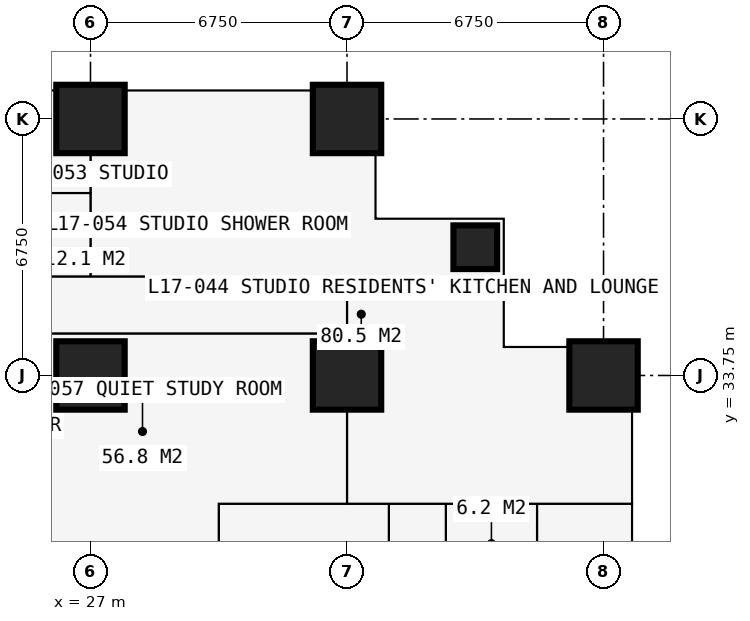
"""IFC4 building model, lengths in metres.
Left out: names, types, materials, properties, quantities, classifications, styles, units other than length and angle.
Written with IfcOpenShell. Run it as: python <this file> out.ifc"""

import sys

from ifc_helpers import new_model, si_unit, direction, frame, frame_2d, origin, origin_2d, place, context, subcontext, project, spatial, rectangle, extrude, element, fill, save


model = new_model("IFC4")
c1 = context("Model", 3, precision=1e-05, world=origin(), true_north=direction((0.0, 1.0)))
c2 = subcontext(c1, "Body", "Model", "MODEL_VIEW")
j1 = project(units=[si_unit("LENGTHUNIT", "METRE"), si_unit("PLANEANGLEUNIT", "RADIAN")], contexts=[c1])
p1 = place(None, origin())
s1 = spatial("IfcSite", under=j1, at=p1, CompositionType="ELEMENT")
p2 = place(p1, origin())
s2 = spatial("IfcBuilding", under=s1, at=p2, CompositionType="ELEMENT")
p3 = place(p2, frame((0.0, 0.0, 64.8)))
s3 = spatial("IfcBuildingStorey", under=s2, at=p3, CompositionType="ELEMENT", Elevation=64.8)
for number, where, z_axis, x_axis in (
    (1, (27.0, 33.75, 0.0), (0.0, 0.0, 1.0), (1.0, 0.0, 0.0)),
    (2, (27.0, 40.5, 0.0), (0.0, 0.0, 1.0), (1.0, 0.0, 0.0)),
    (3, (33.75, 33.75, 0.0), (0.0, 0.0, 1.0), (1.0, 0.0, 0.0)),
    (4, (33.75, 40.5, 0.0), (0.0, 0.0, 1.0), (1.0, 0.0, 0.0)),
):
    element("IfcColumn", number, at=place(p3, frame(where, z_axis=z_axis, x_axis=x_axis)), inside=s3, PredefinedType="COLUMN", context=c2, shape_type="SweptSolid", body=[
        extrude(rectangle(XDim=1.8, YDim=1.8, at=origin_2d()), origin(), (0.0, 0.0, 1.0), 3.6),
    ])
p4 = place(p3, frame((37.125, 37.125, 0.0), z_axis=(0.0, 0.0, 1.0), x_axis=(1.0, 0.0, 0.0)))
e5 = element("IfcColumn", 5, at=p4, inside=s3, PredefinedType="COLUMN", context=c2, shape_type="SweptSolid", body=[
    extrude(rectangle(XDim=1.15, YDim=1.15, at=origin_2d()), origin(), (0.0, 0.0, 1.0), 3.6),
])
p5 = place(p3, frame((40.5, 33.75, 0.0), z_axis=(0.0, 0.0, 1.0), x_axis=(1.0, 0.0, 0.0)))
e6 = element("IfcColumn", 6, at=p5, inside=s3, PredefinedType="COLUMN", context=c2, shape_type="SweptSolid", body=[
    extrude(rectangle(XDim=1.8, YDim=1.8, at=origin_2d()), origin(), (0.0, 0.0, 1.0), 3.6),
])
p6 = place(p3, frame((41.25, 34.5, 0.0), z_axis=(0.0, 0.0, 1.0), x_axis=(-1.0, 0.0, 0.0)))
e7 = element("IfcWall", 7, at=p6, inside=s3, PredefinedType="SOLIDWALL", context=c2, shape_type="SweptSolid", body=[
    extrude(rectangle(XDim=3.375, YDim=0.3, at=frame_2d((1.688, 0.0))), origin(), (0.0, 0.0, 1.0), 3.375),
])
p7 = place(p6, frame((1.833, 0.0, 0.9)))
e8 = element("IfcOpeningElement", 8, at=p7, cuts=e7, PredefinedType="OPENING", context=c2, shape_type="SweptSolid", body=[
    extrude(rectangle(XDim=1.2, YDim=1.8, at=frame_2d((0.6, 0.9))), frame((0.0, 0.16, 0.0), z_axis=(0.0, -1.0, 0.0), x_axis=(1.0, 0.0, 0.0)), (0.0, 0.0, 1.0), 0.32),
])
p8 = place(p3, frame((37.875, 34.5, 0.0), z_axis=(0.0, 0.0, 1.0), x_axis=(0.0, 1.0, 0.0)))
e9 = element("IfcWall", 9, at=p8, inside=s3, PredefinedType="SOLIDWALL", context=c2, shape_type="SweptSolid", body=[
    extrude(rectangle(XDim=3.375, YDim=0.3, at=frame_2d((1.688, 0.0))), origin(), (0.0, 0.0, 1.0), 3.375),
])
p9 = place(p8, frame((0.788, 0.0, 0.6)))
e10 = element("IfcOpeningElement", 10, at=p9, cuts=e9, PredefinedType="OPENING", context=c2, shape_type="SweptSolid", body=[
    extrude(rectangle(XDim=1.8, YDim=2.1, at=frame_2d((0.9, 1.05))), frame((0.0, 0.16, 0.0), z_axis=(0.0, -1.0, 0.0), x_axis=(1.0, 0.0, 0.0)), (0.0, 0.0, 1.0), 0.32),
])
p10 = place(p3, frame((37.875, 37.875, 0.0), z_axis=(0.0, 0.0, 1.0), x_axis=(-1.0, 0.0, 0.0)))
e11 = element("IfcWall", 11, at=p10, inside=s3, PredefinedType="SOLIDWALL", context=c2, shape_type="SweptSolid", body=[
    extrude(rectangle(XDim=3.375, YDim=0.3, at=frame_2d((1.688, 0.0))), origin(), (0.0, 0.0, 1.0), 3.375),
])
p11 = place(p10, frame((0.788, 0.0, 0.6)))
e12 = element("IfcOpeningElement", 12, at=p11, cuts=e11, PredefinedType="OPENING", context=c2, shape_type="SweptSolid", body=[
    extrude(rectangle(XDim=1.8, YDim=2.1, at=frame_2d((0.9, 1.05))), frame((0.0, 0.16, 0.0), z_axis=(0.0, -1.0, 0.0), x_axis=(1.0, 0.0, 0.0)), (0.0, 0.0, 1.0), 0.32),
])
p12 = place(p3, frame((34.5, 37.875, 0.0), z_axis=(0.0, 0.0, 1.0), x_axis=(0.0, 1.0, 0.0)))
e13 = element("IfcWall", 13, at=p12, inside=s3, PredefinedType="SOLIDWALL", context=c2, shape_type="SweptSolid", body=[
    extrude(rectangle(XDim=3.375, YDim=0.3, at=frame_2d((1.688, 0.0))), origin(), (0.0, 0.0, 1.0), 3.375),
])
p13 = place(p12, frame((0.343, 0.0, 0.9)))
e14 = element("IfcOpeningElement", 14, at=p13, cuts=e13, PredefinedType="OPENING", context=c2, shape_type="SweptSolid", body=[
    extrude(rectangle(XDim=1.2, YDim=1.8, at=frame_2d((0.6, 0.9))), frame((0.0, 0.16, 0.0), z_axis=(0.0, -1.0, 0.0), x_axis=(1.0, 0.0, 0.0)), (0.0, 0.0, 1.0), 0.32),
])
p14 = place(p3, frame((20.25, 41.25, 0.0), z_axis=(0.0, 0.0, 1.0), x_axis=(1.0, 0.0, 0.0)))
e15 = element("IfcWall", 15, at=p14, inside=s3, PredefinedType="SOLIDWALL", context=c2, shape_type="SweptSolid", body=[
    extrude(rectangle(XDim=6.75, YDim=0.15, at=frame_2d((3.375, 0.0))), origin(), (0.0, 0.0, 1.0), 3.375),
])
p15 = place(p14, frame((0.962, 0.0, 0.0)))
e16 = element("IfcOpeningElement", 16, at=p15, cuts=e15, PredefinedType="OPENING", context=c2, shape_type="SweptSolid", body=[
    extrude(rectangle(XDim=1.0, YDim=2.2, at=frame_2d((0.5, 1.1))), frame((0.0, 0.085, 0.0), z_axis=(0.0, -1.0, 0.0), x_axis=(1.0, 0.0, 0.0)), (0.0, 0.0, 1.0), 0.17),
])
p16 = place(p14, frame((2.025, 0.0, 0.9)))
e17 = element("IfcOpeningElement", 17, at=p16, cuts=e15, PredefinedType="OPENING", context=c2, shape_type="SweptSolid", body=[
    extrude(rectangle(XDim=1.2, YDim=1.8, at=frame_2d((0.6, 0.9))), frame((0.0, 0.085, 0.0), z_axis=(0.0, -1.0, 0.0), x_axis=(1.0, 0.0, 0.0)), (0.0, 0.0, 1.0), 0.17),
])
p17 = place(p14, frame((4.788, 0.0, 0.0)))
e18 = element("IfcOpeningElement", 18, at=p17, cuts=e15, PredefinedType="OPENING", context=c2, shape_type="SweptSolid", body=[
    extrude(rectangle(XDim=1.0, YDim=2.2, at=frame_2d((0.5, 1.1))), frame((0.0, 0.085, 0.0), z_axis=(0.0, -1.0, 0.0), x_axis=(1.0, 0.0, 0.0)), (0.0, 0.0, 1.0), 0.17),
])
p18 = place(p14, frame((3.525, 0.0, 0.9)))
e19 = element("IfcOpeningElement", 19, at=p18, cuts=e15, PredefinedType="OPENING", context=c2, shape_type="SweptSolid", body=[
    extrude(rectangle(XDim=1.2, YDim=1.8, at=frame_2d((0.6, 0.9))), frame((0.0, 0.085, 0.0), z_axis=(0.0, -1.0, 0.0), x_axis=(1.0, 0.0, 0.0)), (0.0, 0.0, 1.0), 0.17),
])
p19 = place(p3, frame((10.125, 36.35, 0.0), z_axis=(0.0, 0.0, 1.0), x_axis=(1.0, 0.0, 0.0)))
e20 = element("IfcWall", 20, at=p19, inside=s3, PredefinedType="PARTITIONING", context=c2, shape_type="SweptSolid", body=[
    extrude(rectangle(XDim=23.625, YDim=0.1, at=frame_2d((11.812, 0.0))), origin(), (0.0, 0.0, 1.0), 3.375),
])
p20 = place(p19, frame((0.2, 0.0, 0.0)))
e21 = element("IfcOpeningElement", 21, at=p20, cuts=e20, PredefinedType="OPENING", context=c2, shape_type="SweptSolid", body=[
    extrude(rectangle(XDim=0.95, YDim=2.2, at=frame_2d((0.475, 1.1))), frame((0.0, 0.06, 0.0), z_axis=(0.0, -1.0, 0.0), x_axis=(1.0, 0.0, 0.0)), (0.0, 0.0, 1.0), 0.12),
])
p21 = place(p19, frame((3.625, 0.0, 0.0)))
e22 = element("IfcOpeningElement", 22, at=p21, cuts=e20, PredefinedType="OPENING", context=c2, shape_type="SweptSolid", body=[
    extrude(rectangle(XDim=0.95, YDim=2.2, at=frame_2d((0.475, 1.1))), frame((0.0, 0.06, 0.0), z_axis=(0.0, -1.0, 0.0), x_axis=(1.0, 0.0, 0.0)), (0.0, 0.0, 1.0), 0.12),
])
p22 = place(p19, frame((7.0, 0.0, 0.0)))
e23 = element("IfcOpeningElement", 23, at=p22, cuts=e20, PredefinedType="OPENING", context=c2, shape_type="SweptSolid", body=[
    extrude(rectangle(XDim=0.95, YDim=2.2, at=frame_2d((0.475, 1.1))), frame((0.0, 0.06, 0.0), z_axis=(0.0, -1.0, 0.0), x_axis=(1.0, 0.0, 0.0)), (0.0, 0.0, 1.0), 0.12),
])
p23 = place(p19, frame((10.375, 0.0, 0.0)))
e24 = element("IfcOpeningElement", 24, at=p23, cuts=e20, PredefinedType="OPENING", context=c2, shape_type="SweptSolid", body=[
    extrude(rectangle(XDim=0.95, YDim=2.2, at=frame_2d((0.475, 1.1))), frame((0.0, 0.06, 0.0), z_axis=(0.0, -1.0, 0.0), x_axis=(1.0, 0.0, 0.0)), (0.0, 0.0, 1.0), 0.12),
])
p24 = place(p19, frame((13.75, 0.0, 0.0)))
e25 = element("IfcOpeningElement", 25, at=p24, cuts=e20, PredefinedType="OPENING", context=c2, shape_type="SweptSolid", body=[
    extrude(rectangle(XDim=0.95, YDim=2.2, at=frame_2d((0.475, 1.1))), frame((0.0, 0.06, 0.0), z_axis=(0.0, -1.0, 0.0), x_axis=(1.0, 0.0, 0.0)), (0.0, 0.0, 1.0), 0.12),
])
p25 = place(p3, frame((22.988, 34.85, 0.0), z_axis=(0.0, 0.0, 1.0), x_axis=(1.0, 0.0, 0.0)))
e26 = element("IfcWall", 26, at=p25, inside=s3, PredefinedType="PARTITIONING", context=c2, shape_type="SweptSolid", body=[
    extrude(rectangle(XDim=10.762, YDim=0.15, at=frame_2d((5.381, 0.0))), origin(), (0.0, 0.0, 1.0), 3.375),
])
p26 = place(p25, frame((4.95, 0.0, 0.0)))
e27 = element("IfcOpeningElement", 27, at=p26, cuts=e26, PredefinedType="OPENING", context=c2, shape_type="SweptSolid", body=[
    extrude(rectangle(XDim=0.95, YDim=2.2, at=frame_2d((0.475, 1.1))), frame((0.0, 0.085, 0.0), z_axis=(0.0, -1.0, 0.0), x_axis=(1.0, 0.0, 0.0)), (0.0, 0.0, 1.0), 0.17),
])
p27 = place(p3, frame((25.0, 38.55, 0.0), z_axis=(0.0, 0.0, 1.0), x_axis=(1.0, 0.0, 0.0)))
e28 = element("IfcWall", 28, at=p27, inside=s3, PredefinedType="PARTITIONING", context=c2, shape_type="SweptSolid", body=[
    extrude(rectangle(XDim=2.0, YDim=0.1, at=frame_2d((1.0, 0.0))), origin(), (0.0, 0.0, 1.0), 3.375),
])
p28 = place(p3, frame((27.0, 36.35, 0.0), z_axis=(0.0, 0.0, 1.0), x_axis=(0.0, 1.0, 0.0)))
e29 = element("IfcWall", 29, at=p28, inside=s3, PredefinedType="PARTITIONING", context=c2, shape_type="SweptSolid", body=[
    extrude(rectangle(XDim=4.884, YDim=0.15, at=frame_2d((2.442, 0.0))), origin(), (0.0, 0.0, 1.0), 2.806),
])
p29 = place(p3, frame((30.375, 29.2, 0.0), z_axis=(0.0, 0.0, 1.0), x_axis=(0.0, 1.0, 0.0)))
e30 = element("IfcWall", 30, at=p29, inside=s3, PredefinedType="PARTITIONING", context=c2, shape_type="SweptSolid", body=[
    extrude(rectangle(XDim=1.175, YDim=0.15, at=frame_2d((0.587, 0.0))), origin(), (0.0, 0.0, 1.0), 3.375),
])
p30 = place(p3, frame((30.375, 30.375, 0.0), z_axis=(0.0, 0.0, 1.0), x_axis=(1.0, 0.0, 0.0)))
e31 = element("IfcWall", 31, at=p30, inside=s3, PredefinedType="PARTITIONING", context=c2, shape_type="SweptSolid", body=[
    extrude(rectangle(XDim=10.859, YDim=0.15, at=frame_2d((5.429, 0.0))), origin(), (0.0, 0.0, 1.0), 3.375),
])
p31 = place(p30, frame((4.725, 0.0, 0.0)))
e32 = element("IfcOpeningElement", 32, at=p31, cuts=e31, PredefinedType="OPENING", context=c2, shape_type="SweptSolid", body=[
    extrude(rectangle(XDim=1.0, YDim=2.2, at=frame_2d((0.5, 1.1))), frame((0.0, 0.085, 0.0), z_axis=(0.0, -1.0, 0.0), x_axis=(1.0, 0.0, 0.0)), (0.0, 0.0, 1.0), 0.17),
])
p32 = place(p3, frame((33.75, 30.375, 0.0), z_axis=(0.0, 0.0, 1.0), x_axis=(0.0, 1.0, 0.0)))
e33 = element("IfcWall", 33, at=p32, inside=s3, PredefinedType="PARTITIONING", context=c2, shape_type="SweptSolid", body=[
    extrude(rectangle(XDim=5.975, YDim=0.15, at=frame_2d((2.988, 0.0))), origin(), (0.0, 0.0, 1.0), 2.877),
])
p33 = place(p3, frame((34.85, 12.55, 0.0), z_axis=(0.0, 0.0, 1.0), x_axis=(0.0, 1.0, 0.0)))
e34 = element("IfcWall", 34, at=p33, inside=s3, PredefinedType="PARTITIONING", context=c2, shape_type="SweptSolid", body=[
    extrude(rectangle(XDim=17.825, YDim=0.15, at=frame_2d((8.913, 0.0))), origin(), (0.0, 0.0, 1.0), 3.375),
])
p34 = place(p33, frame((8.6, 0.0, 0.0)))
e35 = element("IfcOpeningElement", 35, at=p34, cuts=e34, PredefinedType="OPENING", context=c2, shape_type="SweptSolid", body=[
    extrude(rectangle(XDim=0.95, YDim=2.2, at=frame_2d((0.475, 1.1))), frame((0.0, 0.085, 0.0), z_axis=(0.0, -1.0, 0.0), x_axis=(1.0, 0.0, 0.0)), (0.0, 0.0, 1.0), 0.17),
])
p35 = place(p3, frame((36.35, 6.75, 0.0), z_axis=(0.0, 0.0, 1.0), x_axis=(0.0, 1.0, 0.0)))
e36 = element("IfcWall", 36, at=p35, inside=s3, PredefinedType="PARTITIONING", context=c2, shape_type="SweptSolid", body=[
    extrude(rectangle(XDim=23.625, YDim=0.15, at=frame_2d((11.812, 0.0))), origin(), (0.0, 0.0, 1.0), 3.375),
])
p36 = place(p35, frame((18.475, 0.0, 0.0)))
e37 = element("IfcOpeningElement", 37, at=p36, cuts=e36, PredefinedType="OPENING", context=c2, shape_type="SweptSolid", body=[
    extrude(rectangle(XDim=0.95, YDim=2.2, at=frame_2d((0.475, 1.1))), frame((0.0, 0.085, 0.0), z_axis=(0.0, -1.0, 0.0), x_axis=(1.0, 0.0, 0.0)), (0.0, 0.0, 1.0), 0.17),
])
p37 = place(p35, frame((11.725, 0.0, 0.0)))
e38 = element("IfcOpeningElement", 38, at=p37, cuts=e36, PredefinedType="OPENING", context=c2, shape_type="SweptSolid", body=[
    extrude(rectangle(XDim=0.95, YDim=2.2, at=frame_2d((0.475, 1.1))), frame((0.0, 0.085, 0.0), z_axis=(0.0, -1.0, 0.0), x_axis=(1.0, 0.0, 0.0)), (0.0, 0.0, 1.0), 0.17),
])
p38 = place(p35, frame((6.95, 0.0, 0.0)))
e39 = element("IfcOpeningElement", 39, at=p38, cuts=e36, PredefinedType="OPENING", context=c2, shape_type="SweptSolid", body=[
    extrude(rectangle(XDim=0.95, YDim=2.2, at=frame_2d((0.475, 1.1))), frame((0.0, 0.085, 0.0), z_axis=(0.0, -1.0, 0.0), x_axis=(1.0, 0.0, 0.0)), (0.0, 0.0, 1.0), 0.17),
])
p39 = place(p3, frame((38.75, 27.775, 0.0), z_axis=(0.0, 0.0, 1.0), x_axis=(0.0, 1.0, 0.0)))
e40 = element("IfcWall", 40, at=p39, inside=s3, PredefinedType="PARTITIONING", context=c2, shape_type="SweptSolid", body=[
    extrude(rectangle(XDim=2.6, YDim=0.1, at=frame_2d((1.3, 0.0))), origin(), (0.0, 0.0, 1.0), 3.375),
])
p40 = place(p39, frame((0.85, 0.0, 0.0)))
e41 = element("IfcOpeningElement", 41, at=p40, cuts=e40, PredefinedType="OPENING", context=c2, shape_type="SweptSolid", body=[
    extrude(rectangle(XDim=0.9, YDim=2.2, at=frame_2d((0.45, 1.1))), frame((0.0, 0.06, 0.0), z_axis=(0.0, -1.0, 0.0), x_axis=(1.0, 0.0, 0.0)), (0.0, 0.0, 1.0), 0.12),
])
p41 = place(p7, origin())
e42 = element("IfcWindow", 42, at=p41, inside=s3, PartitioningType="SINGLE_PANEL", PredefinedType="WINDOW", context=c2, shape_type="SweptSolid", body=[
    extrude(rectangle(XDim=1.2, YDim=1.8, at=frame_2d((0.6, 0.9))), frame((0.0, 0.03, 0.0), z_axis=(0.0, -1.0, 0.0), x_axis=(1.0, 0.0, 0.0)), (0.0, 0.0, 1.0), 0.06),
])
fill(e8, e42)
p42 = place(p9, origin())
e43 = element("IfcWindow", 43, at=p42, inside=s3, PartitioningType="SINGLE_PANEL", PredefinedType="WINDOW", context=c2, shape_type="SweptSolid", body=[
    extrude(rectangle(XDim=1.8, YDim=2.1, at=frame_2d((0.9, 1.05))), frame((0.0, 0.03, 0.0), z_axis=(0.0, -1.0, 0.0), x_axis=(1.0, 0.0, 0.0)), (0.0, 0.0, 1.0), 0.06),
])
fill(e10, e43)
p43 = place(p11, origin())
e44 = element("IfcWindow", 44, at=p43, inside=s3, PartitioningType="SINGLE_PANEL", PredefinedType="WINDOW", context=c2, shape_type="SweptSolid", body=[
    extrude(rectangle(XDim=1.8, YDim=2.1, at=frame_2d((0.9, 1.05))), frame((0.0, 0.03, 0.0), z_axis=(0.0, -1.0, 0.0), x_axis=(1.0, 0.0, 0.0)), (0.0, 0.0, 1.0), 0.06),
])
fill(e12, e44)
p44 = place(p13, origin())
e45 = element("IfcWindow", 45, at=p44, inside=s3, PartitioningType="SINGLE_PANEL", PredefinedType="WINDOW", context=c2, shape_type="SweptSolid", body=[
    extrude(rectangle(XDim=1.2, YDim=1.8, at=frame_2d((0.6, 0.9))), frame((0.0, 0.03, 0.0), z_axis=(0.0, -1.0, 0.0), x_axis=(1.0, 0.0, 0.0)), (0.0, 0.0, 1.0), 0.06),
])
fill(e14, e45)
p45 = place(p17, origin())
e46 = element("IfcDoor", 46, at=p45, inside=s3, OperationType="SINGLE_SWING_RIGHT", PredefinedType="DOOR", context=c2, shape_type="SweptSolid", body=[
    extrude(rectangle(XDim=1.0, YDim=2.2, at=frame_2d((0.5, 1.1))), frame((0.0, 0.025, 0.0), z_axis=(0.0, -1.0, 0.0), x_axis=(1.0, 0.0, 0.0)), (0.0, 0.0, 1.0), 0.05),
])
fill(e18, e46)
p46 = place(p40, origin())
e47 = element("IfcDoor", 47, at=p46, inside=s3, OperationType="SINGLE_SWING_RIGHT", PredefinedType="DOOR", context=c2, shape_type="SweptSolid", body=[
    extrude(rectangle(XDim=0.9, YDim=2.2, at=frame_2d((0.45, 1.1))), frame((0.0, 0.025, 0.0), z_axis=(0.0, -1.0, 0.0), x_axis=(1.0, 0.0, 0.0)), (0.0, 0.0, 1.0), 0.05),
])
fill(e41, e47)
p47 = place(p31, origin())
e48 = element("IfcDoor", 48, at=p47, inside=s3, OperationType="SINGLE_SWING_LEFT", PredefinedType="DOOR", context=c2, shape_type="SweptSolid", body=[
    extrude(rectangle(XDim=1.0, YDim=2.2, at=frame_2d((0.5, 1.1))), frame((0.0, 0.025, 0.0), z_axis=(0.0, -1.0, 0.0), x_axis=(1.0, 0.0, 0.0)), (0.0, 0.0, 1.0), 0.05),
])
fill(e32, e48)
p48 = place(p26, origin())
e49 = element("IfcDoor", 49, at=p48, inside=s3, OperationType="SINGLE_SWING_LEFT", PredefinedType="DOOR", context=c2, shape_type="SweptSolid", body=[
    extrude(rectangle(XDim=0.95, YDim=2.2, at=frame_2d((0.475, 1.1))), frame((0.0, 0.025, 0.0), z_axis=(0.0, -1.0, 0.0), x_axis=(1.0, 0.0, 0.0)), (0.0, 0.0, 1.0), 0.05),
])
fill(e27, e49)
save(model, sys.argv[1])
